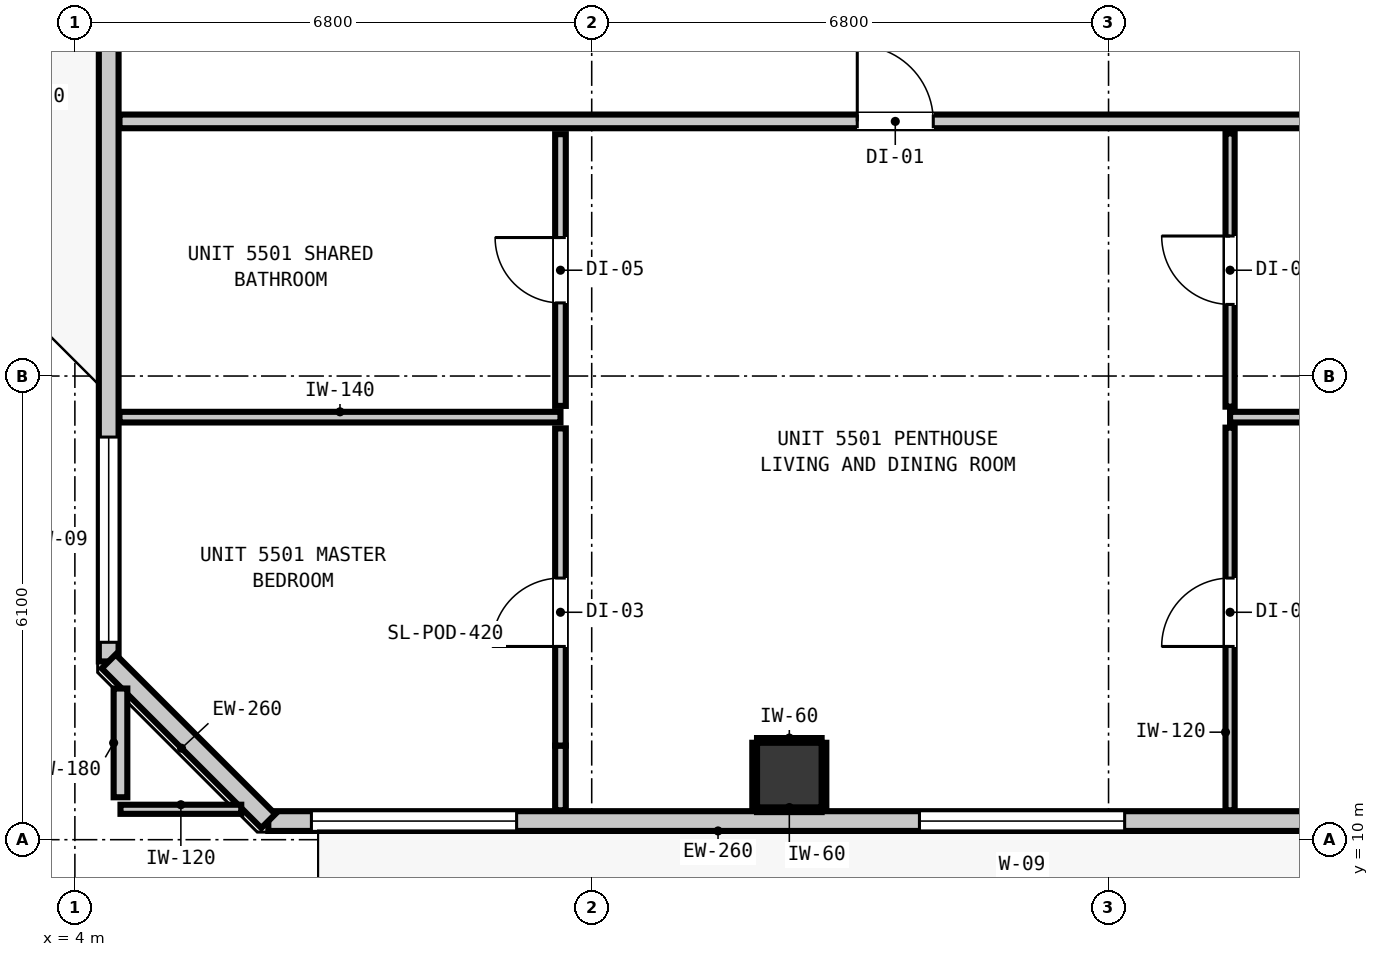
"""IFC4 building model, lengths in metres.
Left out: names, types, materials, properties, quantities, classifications, styles, units other than length and angle.
Written with IfcOpenShell. Run it as: python <this file> out.ifc"""

import sys

from ifc_helpers import new_model, si_unit, direction, frame, frame_2d, origin, origin_2d, place, context, subcontext, project, spatial, rectangle, extrude, element, fill, save


model = new_model("IFC4")
c1 = context("Model", 3, precision=1e-05, world=origin(), true_north=direction((0.0, 1.0)))
c2 = subcontext(c1, "Body", "Model", "MODEL_VIEW")
j1 = project(units=[si_unit("LENGTHUNIT", "METRE"), si_unit("PLANEANGLEUNIT", "RADIAN")], contexts=[c1])
p1 = place(None, origin())
s1 = spatial("IfcSite", under=j1, at=p1, CompositionType="ELEMENT")
p2 = place(p1, origin())
s2 = spatial("IfcBuilding", under=s1, at=p2, CompositionType="ELEMENT")
p3 = place(p2, frame((0.0, 0.0, 190.16)))
s3 = spatial("IfcBuildingStorey", under=s2, at=p3, CompositionType="ELEMENT", Elevation=190.16)
p4 = place(p3, frame((13.4, 10.85, -0.2), z_axis=(0.0, 0.0, 1.0), x_axis=(1.0, 0.0, 0.0)))
e1 = element("IfcColumn", 1, at=p4, inside=s3, PredefinedType="COLUMN", context=c2, shape_type="SweptSolid", body=[
    extrude(rectangle(XDim=0.85, YDim=0.85, at=origin_2d()), origin(), (0.0, 0.0, 1.0), 3.52),
])
p5 = place(p3, frame((4.445, 12.345, 0.0), z_axis=(0.0, 0.0, 1.0), x_axis=(0.0, 1.0, 0.0)))
e2 = element("IfcWall", 2, at=p5, inside=s3, PredefinedType="STANDARD", context=c2, shape_type="SweptSolid", body=[
    extrude(rectangle(XDim=30.31, YDim=0.26, at=frame_2d((15.155, 0.0))), origin(), (0.0, 0.0, 1.0), 3.1),
])
p6 = place(p5, frame((10.728, 0.0, 0.0)))
e3 = element("IfcOpeningElement", 3, at=p6, cuts=e2, PredefinedType="OPENING", context=c2, shape_type="SweptSolid", body=[
    extrude(rectangle(XDim=1.1, YDim=2.15, at=frame_2d((0.55, 1.075))), frame((0.0, 0.14, 0.0), z_axis=(0.0, -1.0, 0.0), x_axis=(1.0, 0.0, 0.0)), (0.0, 0.0, 1.0), 0.28),
])
p7 = place(p5, frame((0.252, 0.0, 0.85)))
e4 = element("IfcOpeningElement", 4, at=p7, cuts=e2, PredefinedType="OPENING", context=c2, shape_type="SweptSolid", body=[
    extrude(rectangle(XDim=2.7, YDim=2.0, at=frame_2d((1.35, 1.0))), frame((0.0, 0.14, 0.0), z_axis=(0.0, -1.0, 0.0), x_axis=(1.0, 0.0, 0.0)), (0.0, 0.0, 1.0), 0.28),
])
p8 = place(p3, frame((39.255, 10.245, 0.0), z_axis=(0.0, 0.0, 1.0), x_axis=(-1.0, 0.0, 0.0)))
e5 = element("IfcWall", 5, at=p8, inside=s3, PredefinedType="STANDARD", context=c2, shape_type="SweptSolid", body=[
    extrude(rectangle(XDim=32.71, YDim=0.26, at=frame_2d((16.355, 0.0))), origin(), (0.0, 0.0, 1.0), 3.1),
])
p9 = place(p8, frame((4.776, 0.0, 0.0)))
e6 = element("IfcOpeningElement", 6, at=p9, cuts=e5, PredefinedType="OPENING", context=c2, shape_type="SweptSolid", body=[
    extrude(rectangle(XDim=1.0, YDim=2.15, at=frame_2d((0.5, 1.075))), frame((0.0, 0.14, 0.0), z_axis=(0.0, -1.0, 0.0), x_axis=(1.0, 0.0, 0.0)), (0.0, 0.0, 1.0), 0.28),
])
p10 = place(p8, frame((21.443, 0.0, 0.85)))
e7 = element("IfcOpeningElement", 7, at=p10, cuts=e5, PredefinedType="OPENING", context=c2, shape_type="SweptSolid", body=[
    extrude(rectangle(XDim=2.7, YDim=2.0, at=frame_2d((1.35, 1.0))), frame((0.0, 0.14, 0.0), z_axis=(0.0, -1.0, 0.0), x_axis=(1.0, 0.0, 0.0)), (0.0, 0.0, 1.0), 0.28),
])
p11 = place(p8, frame((29.443, 0.0, 0.85)))
e8 = element("IfcOpeningElement", 8, at=p11, cuts=e5, PredefinedType="OPENING", context=c2, shape_type="SweptSolid", body=[
    extrude(rectangle(XDim=2.7, YDim=2.0, at=frame_2d((1.35, 1.0))), frame((0.0, 0.14, 0.0), z_axis=(0.0, -1.0, 0.0), x_axis=(1.0, 0.0, 0.0)), (0.0, 0.0, 1.0), 0.28),
])
p12 = place(p8, frame((14.653, 0.0, 0.85)))
e9 = element("IfcOpeningElement", 9, at=p12, cuts=e5, PredefinedType="OPENING", context=c2, shape_type="SweptSolid", body=[
    extrude(rectangle(XDim=2.7, YDim=2.0, at=frame_2d((1.35, 1.0))), frame((0.0, 0.14, 0.0), z_axis=(0.0, -1.0, 0.0), x_axis=(1.0, 0.0, 0.0)), (0.0, 0.0, 1.0), 0.28),
])
p13 = place(p8, frame((6.65, 0.0, 0.85)))
e10 = element("IfcOpeningElement", 10, at=p13, cuts=e5, PredefinedType="OPENING", context=c2, shape_type="SweptSolid", body=[
    extrude(rectangle(XDim=1.05, YDim=1.65, at=frame_2d((0.525, 0.825))), frame((0.0, 0.14, 0.0), z_axis=(0.0, -1.0, 0.0), x_axis=(1.0, 0.0, 0.0)), (0.0, 0.0, 1.0), 0.28),
])
p14 = place(p8, frame((10.779, 0.0, 0.85)))
e11 = element("IfcOpeningElement", 11, at=p14, cuts=e5, PredefinedType="OPENING", context=c2, shape_type="SweptSolid", body=[
    extrude(rectangle(XDim=2.7, YDim=2.0, at=frame_2d((1.35, 1.0))), frame((0.0, 0.14, 0.0), z_axis=(0.0, -1.0, 0.0), x_axis=(1.0, 0.0, 0.0)), (0.0, 0.0, 1.0), 0.28),
])
p15 = place(p8, frame((1.198, 0.0, 0.85)))
e12 = element("IfcOpeningElement", 12, at=p15, cuts=e5, PredefinedType="OPENING", context=c2, shape_type="SweptSolid", body=[
    extrude(rectangle(XDim=0.9, YDim=1.5, at=frame_2d((0.45, 0.75))), frame((0.0, 0.14, 0.0), z_axis=(0.0, -1.0, 0.0), x_axis=(1.0, 0.0, 0.0)), (0.0, 0.0, 1.0), 0.28),
])
p16 = place(p3, frame((6.545, 10.245, 0.0), z_axis=(0.0, 0.0, 1.0), x_axis=(-0.707106781187, 0.707106781187, 0.0)))
e13 = element("IfcWall", 13, at=p16, inside=s3, PredefinedType="STANDARD", context=c2, shape_type="SweptSolid", body=[
    extrude(rectangle(XDim=2.97, YDim=0.26, at=frame_2d((1.485, 0.0))), origin(), (0.0, 0.0, 1.0), 3.1),
])
p17 = place(p3, frame((4.587, 19.45, 0.0), z_axis=(0.0, 0.0, 1.0), x_axis=(1.0, 0.0, 0.0)))
e14 = element("IfcWall", 14, at=p17, inside=s3, PredefinedType="PARTITIONING", context=c2, shape_type="SweptSolid", body=[
    extrude(rectangle(XDim=36.626, YDim=0.18, at=frame_2d((18.313, 0.0))), origin(), (0.0, 0.0, 1.0), 3.1),
])
p18 = place(p17, frame((9.707, 0.0, 0.0)))
e15 = element("IfcOpeningElement", 15, at=p18, cuts=e14, PredefinedType="OPENING", context=c2, shape_type="SweptSolid", body=[
    extrude(rectangle(XDim=1.0, YDim=2.15, at=frame_2d((0.5, 1.075))), frame((0.0, 0.1, 0.0), z_axis=(0.0, -1.0, 0.0), x_axis=(1.0, 0.0, 0.0)), (0.0, 0.0, 1.0), 0.2),
])
p19 = place(p17, frame((27.763, 0.0, 0.0)))
e16 = element("IfcOpeningElement", 16, at=p19, cuts=e14, PredefinedType="OPENING", context=c2, shape_type="SweptSolid", body=[
    extrude(rectangle(XDim=1.0, YDim=2.15, at=frame_2d((0.5, 1.075))), frame((0.0, 0.1, 0.0), z_axis=(0.0, -1.0, 0.0), x_axis=(1.0, 0.0, 0.0)), (0.0, 0.0, 1.0), 0.2),
])
p20 = place(p3, frame((4.587, 15.559, 0.0), z_axis=(0.0, 0.0, 1.0), x_axis=(1.0, 0.0, 0.0)))
e17 = element("IfcWall", 17, at=p20, inside=s3, PredefinedType="PARTITIONING", context=c2, shape_type="SweptSolid", body=[
    extrude(rectangle(XDim=5.802, YDim=0.14, at=frame_2d((2.901, 0.0))), origin(), (0.0, 0.0, 1.0), 3.1),
])
p21 = place(p3, frame((19.199, 15.559, 0.0), z_axis=(0.0, 0.0, 1.0), x_axis=(1.0, 0.0, 0.0)))
e18 = element("IfcWall", 18, at=p21, inside=s3, PredefinedType="PARTITIONING", context=c2, shape_type="SweptSolid", body=[
    extrude(rectangle(XDim=11.581, YDim=0.14, at=frame_2d((5.791, 0.0))), origin(), (0.0, 0.0, 1.0), 3.1),
])
p22 = place(p3, frame((4.6, 10.4, 0.0), z_axis=(0.0, 0.0, 1.0), x_axis=(1.0, 0.0, 0.0)))
e19 = element("IfcWall", 19, at=p22, inside=s3, PredefinedType="PARTITIONING", context=c2, shape_type="SweptSolid", body=[
    extrude(rectangle(XDim=1.589, YDim=0.12, at=frame_2d((0.794, 0.0))), origin(), (0.0, 0.0, 1.0), 3.1),
])
p23 = place(p3, frame((4.6, 10.558, 0.0), z_axis=(0.0, 0.0, 1.0), x_axis=(0.0, 1.0, 0.0)))
e20 = element("IfcWall", 20, at=p23, inside=s3, PredefinedType="PARTITIONING", context=c2, shape_type="SweptSolid", body=[
    extrude(rectangle(XDim=1.431, YDim=0.18, at=frame_2d((0.715, 0.0))), origin(), (0.0, 0.0, 1.0), 3.1),
])
p24 = place(p3, frame((10.389, 10.387, 0.0), z_axis=(0.0, 0.0, 1.0), x_axis=(0.0, 1.0, 0.0)))
e21 = element("IfcWall", 21, at=p24, inside=s3, PredefinedType="PARTITIONING", context=c2, shape_type="SweptSolid", body=[
    extrude(rectangle(XDim=0.851, YDim=0.14, at=frame_2d((0.426, 0.0))), origin(), (0.0, 0.0, 1.0), 3.1),
])
p25 = place(p3, frame((10.389, 11.238, 0.0), z_axis=(0.0, 0.0, 1.0), x_axis=(0.0, 1.0, 0.0)))
e22 = element("IfcWall", 22, at=p25, inside=s3, PredefinedType="PARTITIONING", context=c2, shape_type="SweptSolid", body=[
    extrude(rectangle(XDim=4.173, YDim=0.14, at=frame_2d((2.086, 0.0))), origin(), (0.0, 0.0, 1.0), 2.477),
])
p26 = place(p25, frame((1.304, 0.0, 0.0)))
e23 = element("IfcOpeningElement", 23, at=p26, cuts=e22, PredefinedType="OPENING", context=c2, shape_type="SweptSolid", body=[
    extrude(rectangle(XDim=0.9, YDim=2.1, at=frame_2d((0.45, 1.05))), frame((0.0, 0.08, 0.0), z_axis=(0.0, -1.0, 0.0), x_axis=(1.0, 0.0, 0.0)), (0.0, 0.0, 1.0), 0.16),
])
p27 = place(p3, frame((10.389, 15.707, 0.0), z_axis=(0.0, 0.0, 1.0), x_axis=(0.0, 1.0, 0.0)))
e24 = element("IfcWall", 24, at=p27, inside=s3, PredefinedType="PARTITIONING", context=c2, shape_type="SweptSolid", body=[
    extrude(rectangle(XDim=3.575, YDim=0.14, at=frame_2d((1.788, 0.0))), origin(), (0.0, 0.0, 1.0), 3.1),
])
p28 = place(p27, frame((1.355, 0.0, 0.0)))
e25 = element("IfcOpeningElement", 25, at=p28, cuts=e24, PredefinedType="OPENING", context=c2, shape_type="SweptSolid", body=[
    extrude(rectangle(XDim=0.86, YDim=2.02, at=frame_2d((0.43, 1.01))), frame((0.0, 0.08, 0.0), z_axis=(0.0, -1.0, 0.0), x_axis=(1.0, 0.0, 0.0)), (0.0, 0.0, 1.0), 0.16),
])
p29 = place(p3, frame((19.199, 10.387, 0.0), z_axis=(0.0, 0.0, 1.0), x_axis=(0.0, 1.0, 0.0)))
e26 = element("IfcWall", 26, at=p29, inside=s3, PredefinedType="PARTITIONING", context=c2, shape_type="SweptSolid", body=[
    extrude(rectangle(XDim=5.034, YDim=0.12, at=frame_2d((2.517, 0.0))), origin(), (0.0, 0.0, 1.0), 3.1),
])
p30 = place(p29, frame((2.155, 0.0, 0.0)))
e27 = element("IfcOpeningElement", 27, at=p30, cuts=e26, PredefinedType="OPENING", context=c2, shape_type="SweptSolid", body=[
    extrude(rectangle(XDim=0.9, YDim=2.1, at=frame_2d((0.45, 1.05))), frame((0.0, 0.07, 0.0), z_axis=(0.0, -1.0, 0.0), x_axis=(1.0, 0.0, 0.0)), (0.0, 0.0, 1.0), 0.14),
])
p31 = place(p3, frame((19.199, 15.697, 0.0), z_axis=(0.0, 0.0, 1.0), x_axis=(0.0, 1.0, 0.0)))
e28 = element("IfcWall", 28, at=p31, inside=s3, PredefinedType="PARTITIONING", context=c2, shape_type="SweptSolid", body=[
    extrude(rectangle(XDim=3.595, YDim=0.12, at=frame_2d((1.797, 0.0))), origin(), (0.0, 0.0, 1.0), 3.1),
])
p32 = place(p31, frame((1.345, 0.0, 0.0)))
e29 = element("IfcOpeningElement", 29, at=p32, cuts=e28, PredefinedType="OPENING", context=c2, shape_type="SweptSolid", body=[
    extrude(rectangle(XDim=0.9, YDim=2.1, at=frame_2d((0.45, 1.05))), frame((0.0, 0.07, 0.0), z_axis=(0.0, -1.0, 0.0), x_axis=(1.0, 0.0, 0.0)), (0.0, 0.0, 1.0), 0.14),
])
for number, where, z_axis, x_axis in (
    (30, (12.975, 10.393, 0.0), (0.0, 0.0, 1.0), (1.0, 0.0, 0.0)),
    (31, (12.975, 11.307, 0.0), (0.0, 0.0, 1.0), (1.0, 0.0, 0.0)),
    (32, (12.943, 10.425, 0.0), (0.0, 0.0, 1.0), (0.0, 1.0, 0.0)),
    (33, (13.857, 10.425, 0.0), (0.0, 0.0, 1.0), (0.0, 1.0, 0.0)),
):
    element("IfcWall", number, at=place(p3, frame(where, z_axis=z_axis, x_axis=x_axis)), inside=s3, PredefinedType="PARTITIONING", context=c2, shape_type="SweptSolid", body=[
        extrude(rectangle(XDim=0.85, YDim=0.06, at=frame_2d((0.425, 0.0))), origin(), (0.0, 0.0, 1.0), 1.45),
    ])
p33 = place(p7, origin())
e34 = element("IfcWindow", 34, at=p33, inside=s3, PartitioningType="SINGLE_PANEL", PredefinedType="WINDOW", context=c2, shape_type="SweptSolid", body=[
    extrude(rectangle(XDim=2.7, YDim=2.0, at=frame_2d((1.35, 1.0))), frame((0.0, 0.03, 0.0), z_axis=(0.0, -1.0, 0.0), x_axis=(1.0, 0.0, 0.0)), (0.0, 0.0, 1.0), 0.06),
])
fill(e4, e34)
p34 = place(p10, origin())
e35 = element("IfcWindow", 35, at=p34, inside=s3, PartitioningType="SINGLE_PANEL", PredefinedType="WINDOW", context=c2, shape_type="SweptSolid", body=[
    extrude(rectangle(XDim=2.7, YDim=2.0, at=frame_2d((1.35, 1.0))), frame((0.0, 0.03, 0.0), z_axis=(0.0, -1.0, 0.0), x_axis=(1.0, 0.0, 0.0)), (0.0, 0.0, 1.0), 0.06),
])
fill(e7, e35)
p35 = place(p11, origin())
e36 = element("IfcWindow", 36, at=p35, inside=s3, PartitioningType="SINGLE_PANEL", PredefinedType="WINDOW", context=c2, shape_type="SweptSolid", body=[
    extrude(rectangle(XDim=2.7, YDim=2.0, at=frame_2d((1.35, 1.0))), frame((0.0, 0.03, 0.0), z_axis=(0.0, -1.0, 0.0), x_axis=(1.0, 0.0, 0.0)), (0.0, 0.0, 1.0), 0.06),
])
fill(e8, e36)
p36 = place(p18, origin())
e37 = element("IfcDoor", 37, at=p36, inside=s3, OperationType="SINGLE_SWING_LEFT", PredefinedType="DOOR", context=c2, shape_type="SweptSolid", body=[
    extrude(rectangle(XDim=1.0, YDim=2.15, at=frame_2d((0.5, 1.075))), frame((0.0, 0.025, 0.0), z_axis=(0.0, -1.0, 0.0), x_axis=(1.0, 0.0, 0.0)), (0.0, 0.0, 1.0), 0.05),
])
fill(e15, e37)
p37 = place(p28, origin())
e38 = element("IfcDoor", 38, at=p37, inside=s3, OperationType="SINGLE_SWING_RIGHT", PredefinedType="DOOR", context=c2, shape_type="SweptSolid", body=[
    extrude(rectangle(XDim=0.86, YDim=2.02, at=frame_2d((0.43, 1.01))), frame((0.0, 0.025, 0.0), z_axis=(0.0, -1.0, 0.0), x_axis=(1.0, 0.0, 0.0)), (0.0, 0.0, 1.0), 0.05),
])
fill(e25, e38)
p38 = place(p26, origin())
e39 = element("IfcDoor", 39, at=p38, inside=s3, OperationType="SINGLE_SWING_LEFT", PredefinedType="DOOR", context=c2, shape_type="SweptSolid", body=[
    extrude(rectangle(XDim=0.9, YDim=2.1, at=frame_2d((0.45, 1.05))), frame((0.0, 0.025, 0.0), z_axis=(0.0, -1.0, 0.0), x_axis=(1.0, 0.0, 0.0)), (0.0, 0.0, 1.0), 0.05),
])
fill(e23, e39)
p39 = place(p32, origin())
e40 = element("IfcDoor", 40, at=p39, inside=s3, OperationType="SINGLE_SWING_RIGHT", PredefinedType="DOOR", context=c2, shape_type="SweptSolid", body=[
    extrude(rectangle(XDim=0.9, YDim=2.1, at=frame_2d((0.45, 1.05))), frame((0.0, 0.025, 0.0), z_axis=(0.0, -1.0, 0.0), x_axis=(1.0, 0.0, 0.0)), (0.0, 0.0, 1.0), 0.05),
])
fill(e29, e40)
p40 = place(p30, origin())
e41 = element("IfcDoor", 41, at=p40, inside=s3, OperationType="SINGLE_SWING_LEFT", PredefinedType="DOOR", context=c2, shape_type="SweptSolid", body=[
    extrude(rectangle(XDim=0.9, YDim=2.1, at=frame_2d((0.45, 1.05))), frame((0.0, 0.025, 0.0), z_axis=(0.0, -1.0, 0.0), x_axis=(1.0, 0.0, 0.0)), (0.0, 0.0, 1.0), 0.05),
])
fill(e27, e41)
save(model, sys.argv[1])
